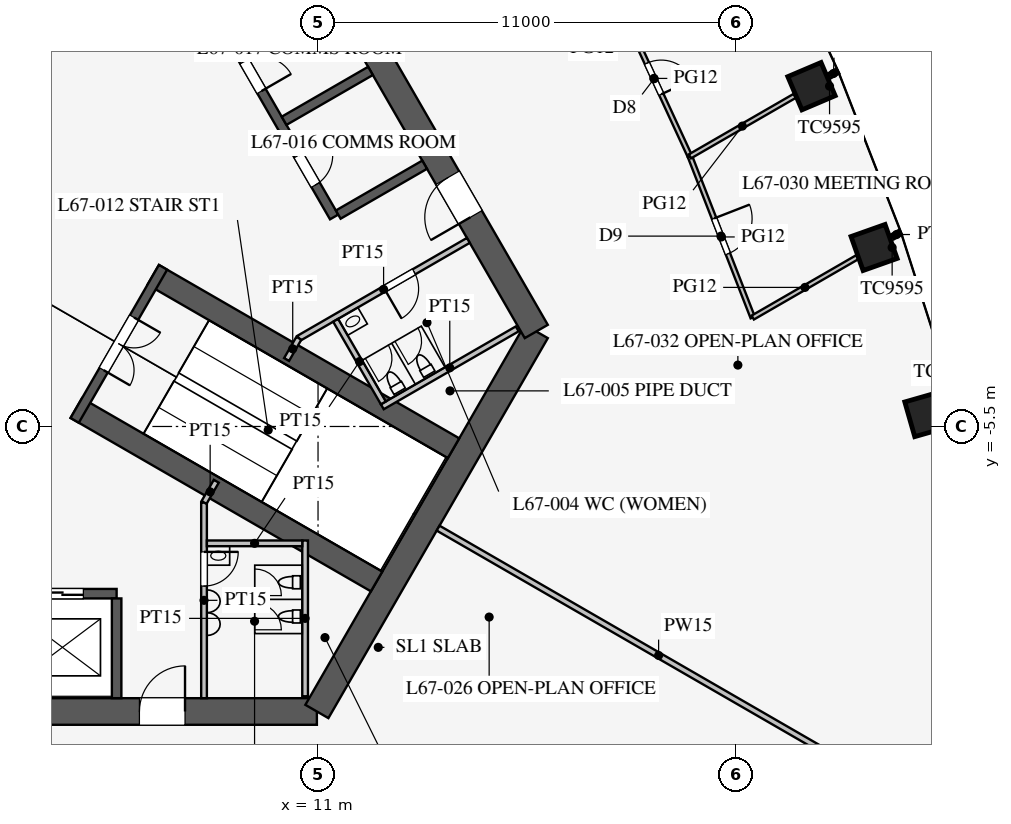
"""IFC4 building model, lengths in metres.
Left out: names, types, materials, properties, quantities, classifications, styles, units other than length and angle.
Written with IfcOpenShell. Run it as: python <this file> out.ifc"""

import sys

from ifc_helpers import new_model, si_unit, direction, frame, frame_2d, origin, origin_2d, place, context, subcontext, project, spatial, rectangle, extrude, element, fill, save


model = new_model("IFC4")
c1 = context("Model", 3, precision=1e-05, world=origin(), true_north=direction((0.0, 1.0)))
c2 = subcontext(c1, "Body", "Model", "MODEL_VIEW")
j1 = project(units=[si_unit("LENGTHUNIT", "METRE"), si_unit("PLANEANGLEUNIT", "RADIAN")], contexts=[c1])
p1 = place(None, origin())
s1 = spatial("IfcSite", under=j1, at=p1, CompositionType="ELEMENT")
p2 = place(p1, origin())
s2 = spatial("IfcBuilding", under=s1, at=p2, CompositionType="ELEMENT")
p3 = place(p2, frame((0.0, 0.0, 293.1)))
s3 = spatial("IfcBuildingStorey", under=s2, at=p3, CompositionType="ELEMENT", Elevation=293.1)
for number, where, z_axis, x_axis in (
    (1, (27.027, -5.18, 0.0), (0.0, 0.0, 1.0), (-0.275, 0.961, 0.0)),
    (2, (25.632, -0.79, 0.0), (0.0, 0.0, 1.0), (-0.334, 0.942, 0.0)),
    (3, (23.985, 3.455, 0.0), (0.0, 0.0, 1.0), (-0.391, 0.92, 0.0)),
):
    element("IfcColumn", number, at=place(p3, frame(where, z_axis=z_axis, x_axis=x_axis)), inside=s3, PredefinedType="COLUMN", context=c2, shape_type="SweptSolid", body=[
        extrude(rectangle(XDim=0.95, YDim=0.95, at=origin_2d()), origin(), (0.0, 0.0, 1.0), 4.2),
    ])
p4 = place(p3, frame((-10.97, -13.0, 0.0), z_axis=(0.0, 0.0, 1.0), x_axis=(1.0, 0.0, 0.0)))
e4 = element("IfcWall", 4, at=p4, inside=s3, PredefinedType="SHEAR", context=c2, shape_type="SweptSolid", body=[
    extrude(rectangle(XDim=21.939, YDim=0.7, at=frame_2d((10.97, 0.0))), origin(), (0.0, 0.0, 1.0), 4.2),
])
p5 = place(p4, frame((17.27, 0.0, 0.0)))
e5 = element("IfcOpeningElement", 5, at=p5, cuts=e4, PredefinedType="OPENING", context=c2, shape_type="SweptSolid", body=[
    extrude(rectangle(XDim=1.2, YDim=2.1, at=frame_2d((0.6, 1.05))), frame((0.0, 0.36, 0.0), z_axis=(0.0, -1.0, 0.0), x_axis=(1.0, 0.0, 0.0)), (0.0, 0.0, 1.0), 0.72),
])
p6 = place(p4, frame((3.47, 0.0, 0.0)))
e6 = element("IfcOpeningElement", 6, at=p6, cuts=e4, PredefinedType="OPENING", context=c2, shape_type="SweptSolid", body=[
    extrude(rectangle(XDim=1.2, YDim=2.1, at=frame_2d((0.6, 1.05))), frame((0.0, 0.36, 0.0), z_axis=(0.0, -1.0, 0.0), x_axis=(1.0, 0.0, 0.0)), (0.0, 0.0, 1.0), 0.72),
])
p7 = place(p3, frame((10.97, -13.0, 0.0), z_axis=(0.0, 0.0, 1.0), x_axis=(0.499995765644, 0.866027848477, 0.0)))
e7 = element("IfcWall", 7, at=p7, inside=s3, PredefinedType="SHEAR", context=c2, shape_type="SweptSolid", body=[
    extrude(rectangle(XDim=11.547, YDim=0.7, at=frame_2d((5.773, 0.0))), origin(), (0.0, 0.0, 1.0), 4.2),
])
p8 = place(p3, frame((16.743, -3.0, 0.0), z_axis=(0.0, 0.0, 1.0), x_axis=(-0.500002442456, 0.866023993627, 0.0)))
e8 = element("IfcWall", 8, at=p8, inside=s3, PredefinedType="SHEAR", context=c2, shape_type="SweptSolid", body=[
    extrude(rectangle(XDim=21.939, YDim=0.7, at=frame_2d((10.97, 0.0))), origin(), (0.0, 0.0, 1.0), 4.2),
])
p9 = place(p8, frame((17.27, 0.0, 0.0)))
e9 = element("IfcOpeningElement", 9, at=p9, cuts=e8, PredefinedType="OPENING", context=c2, shape_type="SweptSolid", body=[
    extrude(rectangle(XDim=1.2, YDim=2.1, at=frame_2d((0.6, 1.05))), frame((0.0, 0.36, 0.0), z_axis=(0.0, -1.0, 0.0), x_axis=(1.0, 0.0, 0.0)), (0.0, 0.0, 1.0), 0.72),
])
p10 = place(p8, frame((3.47, 0.0, 0.0)))
e10 = element("IfcOpeningElement", 10, at=p10, cuts=e8, PredefinedType="OPENING", context=c2, shape_type="SweptSolid", body=[
    extrude(rectangle(XDim=1.2, YDim=2.1, at=frame_2d((0.6, 1.05))), frame((0.0, 0.36, 0.0), z_axis=(0.0, -1.0, 0.0), x_axis=(1.0, 0.0, 0.0)), (0.0, 0.0, 1.0), 0.72),
])
p11 = place(p3, frame((-5.7, -9.9, 0.0), z_axis=(0.0, 0.0, 1.0), x_axis=(1.0, 0.0, 0.0)))
e11 = element("IfcWall", 11, at=p11, inside=s3, PredefinedType="SHEAR", context=c2, shape_type="SweptSolid", body=[
    extrude(rectangle(XDim=11.4, YDim=0.25, at=frame_2d((5.7, 0.0))), origin(), (0.0, 0.0, 1.0), 4.2),
])
p12 = place(p11, frame((0.875, 0.0, 0.0)))
e12 = element("IfcOpeningElement", 12, at=p12, cuts=e11, PredefinedType="OPENING", context=c2, shape_type="SweptSolid", body=[
    extrude(rectangle(XDim=1.1, YDim=2.2, at=frame_2d((0.55, 1.1))), frame((0.0, 0.135, 0.0), z_axis=(0.0, -1.0, 0.0), x_axis=(1.0, 0.0, 0.0)), (0.0, 0.0, 1.0), 0.27),
])
p13 = place(p11, frame((3.725, 0.0, 0.0)))
e13 = element("IfcOpeningElement", 13, at=p13, cuts=e11, PredefinedType="OPENING", context=c2, shape_type="SweptSolid", body=[
    extrude(rectangle(XDim=1.1, YDim=2.2, at=frame_2d((0.55, 1.1))), frame((0.0, 0.135, 0.0), z_axis=(0.0, -1.0, 0.0), x_axis=(1.0, 0.0, 0.0)), (0.0, 0.0, 1.0), 0.27),
])
p14 = place(p11, frame((6.575, 0.0, 0.0)))
e14 = element("IfcOpeningElement", 14, at=p14, cuts=e11, PredefinedType="OPENING", context=c2, shape_type="SweptSolid", body=[
    extrude(rectangle(XDim=1.1, YDim=2.2, at=frame_2d((0.55, 1.1))), frame((0.0, 0.135, 0.0), z_axis=(0.0, -1.0, 0.0), x_axis=(1.0, 0.0, 0.0)), (0.0, 0.0, 1.0), 0.27),
])
p15 = place(p11, frame((9.425, 0.0, 0.0)))
e15 = element("IfcOpeningElement", 15, at=p15, cuts=e11, PredefinedType="OPENING", context=c2, shape_type="SweptSolid", body=[
    extrude(rectangle(XDim=1.1, YDim=2.2, at=frame_2d((0.55, 1.1))), frame((0.0, 0.135, 0.0), z_axis=(0.0, -1.0, 0.0), x_axis=(1.0, 0.0, 0.0)), (0.0, 0.0, 1.0), 0.27),
])
p16 = place(p3, frame((5.7, -10.025, 0.0), z_axis=(0.0, 0.0, 1.0), x_axis=(0.0, -1.0, 0.0)))
e16 = element("IfcWall", 16, at=p16, inside=s3, PredefinedType="SHEAR", context=c2, shape_type="SweptSolid", body=[
    extrude(rectangle(XDim=2.625, YDim=0.25, at=frame_2d((1.312, 0.0))), origin(), (0.0, 0.0, 1.0), 4.2),
])
p17 = place(p3, frame((11.424, 0.014, 0.0), z_axis=(0.0, 0.0, 1.0), x_axis=(-0.500001763848, 0.866024385424, 0.0)))
e17 = element("IfcWall", 17, at=p17, inside=s3, PredefinedType="SHEAR", context=c2, shape_type="SweptSolid", body=[
    extrude(rectangle(XDim=11.4, YDim=0.25, at=frame_2d((5.7, 0.0))), origin(), (0.0, 0.0, 1.0), 4.2),
])
p18 = place(p17, frame((0.975, 0.0, 0.0)))
e18 = element("IfcOpeningElement", 18, at=p18, cuts=e17, PredefinedType="OPENING", context=c2, shape_type="SweptSolid", body=[
    extrude(rectangle(XDim=0.9, YDim=2.1, at=frame_2d((0.45, 1.05))), frame((0.0, 0.135, 0.0), z_axis=(0.0, -1.0, 0.0), x_axis=(1.0, 0.0, 0.0)), (0.0, 0.0, 1.0), 0.27),
])
p19 = place(p17, frame((3.825, 0.0, 0.0)))
e19 = element("IfcOpeningElement", 19, at=p19, cuts=e17, PredefinedType="OPENING", context=c2, shape_type="SweptSolid", body=[
    extrude(rectangle(XDim=0.9, YDim=2.1, at=frame_2d((0.45, 1.05))), frame((0.0, 0.135, 0.0), z_axis=(0.0, -1.0, 0.0), x_axis=(1.0, 0.0, 0.0)), (0.0, 0.0, 1.0), 0.27),
])
p20 = place(p17, frame((6.675, 0.0, 0.0)))
e20 = element("IfcOpeningElement", 20, at=p20, cuts=e17, PredefinedType="OPENING", context=c2, shape_type="SweptSolid", body=[
    extrude(rectangle(XDim=0.9, YDim=2.1, at=frame_2d((0.45, 1.05))), frame((0.0, 0.135, 0.0), z_axis=(0.0, -1.0, 0.0), x_axis=(1.0, 0.0, 0.0)), (0.0, 0.0, 1.0), 0.27),
])
p21 = place(p17, frame((9.525, 0.0, 0.0)))
e21 = element("IfcOpeningElement", 21, at=p21, cuts=e17, PredefinedType="OPENING", context=c2, shape_type="SweptSolid", body=[
    extrude(rectangle(XDim=0.9, YDim=2.1, at=frame_2d((0.45, 1.05))), frame((0.0, 0.135, 0.0), z_axis=(0.0, -1.0, 0.0), x_axis=(1.0, 0.0, 0.0)), (0.0, 0.0, 1.0), 0.27),
])
for number, where, z_axis, x_axis in (
    (22, (11.532, 0.076, 0.0), (0.0, 0.0, 1.0), (0.866, 0.5, 0.0)),
    (23, (10.107, 2.544, 0.0), (0.0, 0.0, 1.0), (0.866, 0.5, 0.0)),
):
    element("IfcWall", number, at=place(p3, frame(where, z_axis=z_axis, x_axis=x_axis)), inside=s3, PredefinedType="SHEAR", context=c2, shape_type="SweptSolid", body=[
        extrude(rectangle(XDim=2.625, YDim=0.25, at=frame_2d((1.312, 0.0))), origin(), (0.0, 0.0, 1.0), 4.2),
    ])
for number, where, z_axis, x_axis in (
    (24, (4.638, -5.016, 0.0), (0.0, 0.0, 1.0), (0.866, -0.5, 0.0)),
    (25, (6.663, -1.509, 0.0), (0.0, 0.0, 1.0), (0.866, -0.5, 0.0)),
):
    element("IfcWall", number, at=place(p3, frame(where, z_axis=z_axis, x_axis=x_axis)), inside=s3, PredefinedType="SHEAR", context=c2, shape_type="SweptSolid", body=[
        extrude(rectangle(XDim=9.125, YDim=0.6, at=frame_2d((4.562, 0.0))), origin(), (0.0, 0.0, 1.0), 4.2),
    ])
p22 = place(p3, frame((4.597, -5.339, 0.0), z_axis=(0.0, 0.0, 1.0), x_axis=(0.499984536904, 0.866034331223, 0.0)))
e26 = element("IfcWall", 26, at=p22, inside=s3, PredefinedType="SHEAR", context=c2, shape_type="SweptSolid", body=[
    extrude(rectangle(XDim=4.65, YDim=0.25, at=frame_2d((2.325, 0.0))), origin(), (0.0, 0.0, 1.0), 4.2),
])
p23 = place(p22, frame((1.525, 0.0, 0.0)))
e27 = element("IfcOpeningElement", 27, at=p23, cuts=e26, PredefinedType="OPENING", context=c2, shape_type="SweptSolid", body=[
    extrude(rectangle(XDim=1.6, YDim=2.1, at=frame_2d((0.8, 1.05))), frame((0.0, 0.135, 0.0), z_axis=(0.0, -1.0, 0.0), x_axis=(1.0, 0.0, 0.0)), (0.0, 0.0, 1.0), 0.27),
])
p24 = place(p3, frame((8.0, -7.5, 0.0), z_axis=(0.0, 0.0, 1.0), x_axis=(0.0, -1.0, 0.0)))
e28 = element("IfcWall", 28, at=p24, inside=s3, PredefinedType="PARTITIONING", context=c2, shape_type="SweptSolid", body=[
    extrude(rectangle(XDim=5.15, YDim=0.15, at=frame_2d((2.575, 0.0))), origin(), (0.0, 0.0, 1.0), 4.0),
])
p25 = place(p24, frame((1.3, 0.0, 0.0)))
e29 = element("IfcOpeningElement", 29, at=p25, cuts=e28, PredefinedType="OPENING", context=c2, shape_type="SweptSolid", body=[
    extrude(rectangle(XDim=0.9, YDim=2.1, at=frame_2d((0.45, 1.05))), frame((0.0, 0.085, 0.0), z_axis=(0.0, -1.0, 0.0), x_axis=(1.0, 0.0, 0.0)), (0.0, 0.0, 1.0), 0.17),
])
p26 = place(p3, frame((10.495, -3.178, 0.0), z_axis=(0.0, 0.0, 1.0), x_axis=(0.866037967349, 0.499978238636, 0.0)))
e30 = element("IfcWall", 30, at=p26, inside=s3, PredefinedType="PARTITIONING", context=c2, shape_type="SweptSolid", body=[
    extrude(rectangle(XDim=5.15, YDim=0.15, at=frame_2d((2.575, 0.0))), origin(), (0.0, 0.0, 1.0), 4.0),
])
p27 = place(p26, frame((2.6, 0.0, 0.0)))
e31 = element("IfcOpeningElement", 31, at=p27, cuts=e30, PredefinedType="OPENING", context=c2, shape_type="SweptSolid", body=[
    extrude(rectangle(XDim=0.9, YDim=2.1, at=frame_2d((0.45, 1.05))), frame((0.0, 0.085, 0.0), z_axis=(0.0, -1.0, 0.0), x_axis=(1.0, 0.0, 0.0)), (0.0, 0.0, 1.0), 0.17),
])
for number, where, z_axis, x_axis in (
    (32, (8.0, -7.5, 0.0), (0.0, 0.0, 1.0), (0.5, 0.866, 0.0)),
    (33, (10.495, -3.178, 0.0), (0.0, 0.0, 1.0), (-0.5, -0.866, 0.0)),
):
    element("IfcWall", number, at=place(p3, frame(where, z_axis=z_axis, x_axis=x_axis)), inside=s3, PredefinedType="PARTITIONING", context=c2, shape_type="SweptSolid", body=[
        extrude(rectangle(XDim=0.645, YDim=0.15, at=frame_2d((0.323, 0.0))), origin(), (0.0, 0.0, 1.0), 4.0),
    ])
p28 = place(p3, frame((10.66, -8.5, 0.0), z_axis=(0.0, 0.0, 1.0), x_axis=(0.0, -1.0, 0.0)))
e34 = element("IfcWall", 34, at=p28, inside=s3, PredefinedType="PARTITIONING", context=c2, shape_type="SweptSolid", body=[
    extrude(rectangle(XDim=4.1, YDim=0.15, at=frame_2d((2.05, 0.0))), origin(), (0.0, 0.0, 1.0), 4.0),
])
p29 = place(p3, frame((8.075, -8.575, 0.0), z_axis=(0.0, 0.0, 1.0), x_axis=(1.0, 0.0, 0.0)))
e35 = element("IfcWall", 35, at=p29, inside=s3, PredefinedType="PARTITIONING", context=c2, shape_type="SweptSolid", body=[
    extrude(rectangle(XDim=2.51, YDim=0.15, at=frame_2d((1.255, 0.0))), origin(), (0.0, 0.0, 1.0), 4.0),
])
p30 = place(p3, frame((12.691, -4.982, 0.0), z_axis=(0.0, 0.0, 1.0), x_axis=(0.8660249478, 0.500000789788, 0.0)))
e36 = element("IfcWall", 36, at=p30, inside=s3, PredefinedType="PARTITIONING", context=c2, shape_type="SweptSolid", body=[
    extrude(rectangle(XDim=4.1, YDim=0.15, at=frame_2d((2.05, 0.0))), origin(), (0.0, 0.0, 1.0), 4.0),
])
p31 = place(p3, frame((11.464, -2.706, 0.0), z_axis=(0.0, 0.0, 1.0), x_axis=(0.50001992892, -0.866013897511, 0.0)))
e37 = element("IfcWall", 37, at=p31, inside=s3, PredefinedType="PARTITIONING", context=c2, shape_type="SweptSolid", body=[
    extrude(rectangle(XDim=2.51, YDim=0.15, at=frame_2d((1.255, 0.0))), origin(), (0.0, 0.0, 1.0), 4.0),
])
p32 = place(p3, frame((14.159, -8.175, 0.0), z_axis=(0.0, 0.0, 1.0), x_axis=(0.866026905467, -0.499997399001, 0.0)))
e38 = element("IfcWall", 38, at=p32, inside=s3, PredefinedType="PARTITIONING", context=c2, shape_type="SweptSolid", body=[
    extrude(rectangle(XDim=13.4, YDim=0.15, at=frame_2d((6.7, 0.0))), origin(), (0.0, 0.0, 1.0), 2.5),
])
p33 = place(p3, frame((26.115, -0.511, 0.0), z_axis=(0.0, 0.0, 1.0), x_axis=(0.866201770413, 0.499694399542, 0.0)))
e39 = element("IfcWall", 39, at=p33, inside=s3, PredefinedType="PARTITIONING", context=c2, shape_type="SweptSolid", body=[
    extrude(rectangle(XDim=0.251, YDim=0.15, at=frame_2d((0.125, 0.0))), origin(), (0.0, 0.0, 1.0), 2.9),
])
p34 = place(p3, frame((24.447, 3.722, 0.0), z_axis=(0.0, 0.0, 1.0), x_axis=(0.866215944259, 0.499669828899, 0.0)))
e40 = element("IfcWall", 40, at=p34, inside=s3, PredefinedType="PARTITIONING", context=c2, shape_type="SweptSolid", body=[
    extrude(rectangle(XDim=0.268, YDim=0.15, at=frame_2d((0.134, 0.0))), origin(), (0.0, 0.0, 1.0), 2.9),
])
p35 = place(p3, frame((22.439, -2.633, 0.0), z_axis=(0.0, 0.0, 1.0), x_axis=(-0.363212149153, 0.931706463811, 0.0)))
e41 = element("IfcWall", 41, at=p35, inside=s3, PredefinedType="PARTITIONING", context=c2, shape_type="SweptSolid", body=[
    extrude(rectangle(XDim=4.553, YDim=0.12, at=frame_2d((2.276, 0.0))), origin(), (0.0, 0.0, 1.0), 2.9),
])
p36 = place(p35, frame((1.8, 0.0, 0.15)))
e42 = element("IfcOpeningElement", 42, at=p36, cuts=e41, PredefinedType="OPENING", context=c2, shape_type="SweptSolid", body=[
    extrude(rectangle(XDim=1.0, YDim=2.1, at=frame_2d((0.5, 1.05))), frame((0.0, 0.07, 0.0), z_axis=(0.0, -1.0, 0.0), x_axis=(1.0, 0.0, 0.0)), (0.0, 0.0, 1.0), 0.14),
])
p37 = place(p3, frame((20.786, 1.608, 0.0), z_axis=(0.0, 0.0, 1.0), x_axis=(-0.419335693458, 0.907831248742, 0.0)))
e43 = element("IfcWall", 43, at=p37, inside=s3, PredefinedType="PARTITIONING", context=c2, shape_type="SweptSolid", body=[
    extrude(rectangle(XDim=4.519, YDim=0.12, at=frame_2d((2.259, 0.0))), origin(), (0.0, 0.0, 1.0), 2.9),
])
p38 = place(p37, frame((1.8, 0.0, 0.15)))
e44 = element("IfcOpeningElement", 44, at=p38, cuts=e43, PredefinedType="OPENING", context=c2, shape_type="SweptSolid", body=[
    extrude(rectangle(XDim=0.9, YDim=2.1, at=frame_2d((0.45, 1.05))), frame((0.0, 0.07, 0.0), z_axis=(0.0, -1.0, 0.0), x_axis=(1.0, 0.0, 0.0)), (0.0, 0.0, 1.0), 0.14),
])
p39 = place(p3, frame((22.439, -2.633, 0.0), z_axis=(0.0, 0.0, 1.0), x_axis=(0.86599465956, 0.500053246778, 0.0)))
e45 = element("IfcWall", 45, at=p39, inside=s3, PredefinedType="PARTITIONING", context=c2, shape_type="SweptSolid", body=[
    extrude(rectangle(XDim=3.173, YDim=0.12, at=frame_2d((1.586, 0.0))), origin(), (0.0, 0.0, 1.0), 2.9),
])
p40 = place(p3, frame((20.786, 1.608, 0.0), z_axis=(0.0, 0.0, 1.0), x_axis=(0.866060515081, 0.499939180519, 0.0)))
e46 = element("IfcWall", 46, at=p40, inside=s3, PredefinedType="PARTITIONING", context=c2, shape_type="SweptSolid", body=[
    extrude(rectangle(XDim=3.186, YDim=0.12, at=frame_2d((1.593, 0.0))), origin(), (0.0, 0.0, 1.0), 2.9),
])
p41 = place(p25, origin())
e47 = element("IfcDoor", 47, at=p41, inside=s3, OperationType="SINGLE_SWING_LEFT", PredefinedType="DOOR", context=c2, shape_type="SweptSolid", body=[
    extrude(rectangle(XDim=0.9, YDim=2.1, at=frame_2d((0.45, 1.05))), frame((0.0, 0.025, 0.0), z_axis=(0.0, -1.0, 0.0), x_axis=(1.0, 0.0, 0.0)), (0.0, 0.0, 1.0), 0.05),
])
fill(e29, e47)
p42 = place(p27, frame((0.9, 0.0, 0.0), z_axis=(0.0, 0.0, 1.0), x_axis=(-1.0, 0.0, 0.0)))
e48 = element("IfcDoor", 48, at=p42, inside=s3, OperationType="SINGLE_SWING_RIGHT", PredefinedType="DOOR", context=c2, shape_type="SweptSolid", body=[
    extrude(rectangle(XDim=0.9, YDim=2.1, at=frame_2d((0.45, 1.05))), frame((0.0, 0.025, 0.0), z_axis=(0.0, -1.0, 0.0), x_axis=(1.0, 0.0, 0.0)), (0.0, 0.0, 1.0), 0.05),
])
fill(e31, e48)
p43 = place(p23, frame((1.6, 0.0, 0.0), z_axis=(0.0, 0.0, 1.0), x_axis=(-1.0, 0.0, 0.0)))
e49 = element("IfcDoor", 49, at=p43, inside=s3, OperationType="DOUBLE_DOOR_SINGLE_SWING", PredefinedType="DOOR", context=c2, shape_type="SweptSolid", body=[
    extrude(rectangle(XDim=1.6, YDim=2.1, at=frame_2d((0.8, 1.05))), frame((0.0, 0.025, 0.0), z_axis=(0.0, -1.0, 0.0), x_axis=(1.0, 0.0, 0.0)), (0.0, 0.0, 1.0), 0.05),
])
fill(e27, e49)
p44 = place(p5, origin())
e50 = element("IfcDoor", 50, at=p44, inside=s3, OperationType="SINGLE_SWING_RIGHT", PredefinedType="DOOR", context=c2, shape_type="SweptSolid", body=[
    extrude(rectangle(XDim=1.2, YDim=2.1, at=frame_2d((0.6, 1.05))), frame((0.0, 0.025, 0.0), z_axis=(0.0, -1.0, 0.0), x_axis=(1.0, 0.0, 0.0)), (0.0, 0.0, 1.0), 0.05),
])
fill(e5, e50)
p45 = place(p10, origin())
e51 = element("IfcDoor", 51, at=p45, inside=s3, OperationType="SINGLE_SWING_LEFT", PredefinedType="DOOR", context=c2, shape_type="SweptSolid", body=[
    extrude(rectangle(XDim=1.2, YDim=2.1, at=frame_2d((0.6, 1.05))), frame((0.0, 0.025, 0.0), z_axis=(0.0, -1.0, 0.0), x_axis=(1.0, 0.0, 0.0)), (0.0, 0.0, 1.0), 0.05),
])
fill(e10, e51)
p46 = place(p18, frame((0.9, 0.0, 0.0), z_axis=(0.0, 0.0, 1.0), x_axis=(-1.0, 0.0, 0.0)))
e52 = element("IfcDoor", 52, at=p46, inside=s3, OperationType="SINGLE_SWING_LEFT", PredefinedType="DOOR", context=c2, shape_type="SweptSolid", body=[
    extrude(rectangle(XDim=0.9, YDim=2.1, at=frame_2d((0.45, 1.05))), frame((0.0, 0.025, 0.0), z_axis=(0.0, -1.0, 0.0), x_axis=(1.0, 0.0, 0.0)), (0.0, 0.0, 1.0), 0.05),
])
fill(e18, e52)
p47 = place(p19, frame((0.9, 0.0, 0.0), z_axis=(0.0, 0.0, 1.0), x_axis=(-1.0, 0.0, 0.0)))
e53 = element("IfcDoor", 53, at=p47, inside=s3, OperationType="SINGLE_SWING_RIGHT", PredefinedType="DOOR", context=c2, shape_type="SweptSolid", body=[
    extrude(rectangle(XDim=0.9, YDim=2.1, at=frame_2d((0.45, 1.05))), frame((0.0, 0.025, 0.0), z_axis=(0.0, -1.0, 0.0), x_axis=(1.0, 0.0, 0.0)), (0.0, 0.0, 1.0), 0.05),
])
fill(e19, e53)
p48 = place(p38, frame((0.9, 0.0, 0.0), z_axis=(0.0, 0.0, 1.0), x_axis=(-1.0, 0.0, 0.0)))
e54 = element("IfcDoor", 54, at=p48, inside=s3, OperationType="SINGLE_SWING_RIGHT", PredefinedType="DOOR", context=c2, shape_type="SweptSolid", body=[
    extrude(rectangle(XDim=0.9, YDim=2.1, at=frame_2d((0.45, 1.05))), frame((0.0, 0.025, 0.0), z_axis=(0.0, -1.0, 0.0), x_axis=(1.0, 0.0, 0.0)), (0.0, 0.0, 1.0), 0.05),
])
fill(e44, e54)
p49 = place(p36, frame((1.0, 0.0, 0.0), z_axis=(0.0, 0.0, 1.0), x_axis=(-1.0, 0.0, 0.0)))
e55 = element("IfcDoor", 55, at=p49, inside=s3, OperationType="SINGLE_SWING_LEFT", PredefinedType="DOOR", context=c2, shape_type="SweptSolid", body=[
    extrude(rectangle(XDim=1.0, YDim=2.1, at=frame_2d((0.5, 1.05))), frame((0.0, 0.025, 0.0), z_axis=(0.0, -1.0, 0.0), x_axis=(1.0, 0.0, 0.0)), (0.0, 0.0, 1.0), 0.05),
])
fill(e42, e55)
p50 = place(p15, origin())
e56 = element("IfcDoor", 56, at=p50, inside=s3, OperationType="DOUBLE_DOOR_SLIDING", PredefinedType="DOOR", context=c2, shape_type="SweptSolid", body=[
    extrude(rectangle(XDim=1.1, YDim=2.2, at=frame_2d((0.55, 1.1))), frame((0.0, 0.025, 0.0), z_axis=(0.0, -1.0, 0.0), x_axis=(1.0, 0.0, 0.0)), (0.0, 0.0, 1.0), 0.05),
])
fill(e15, e56)
save(model, sys.argv[1])
